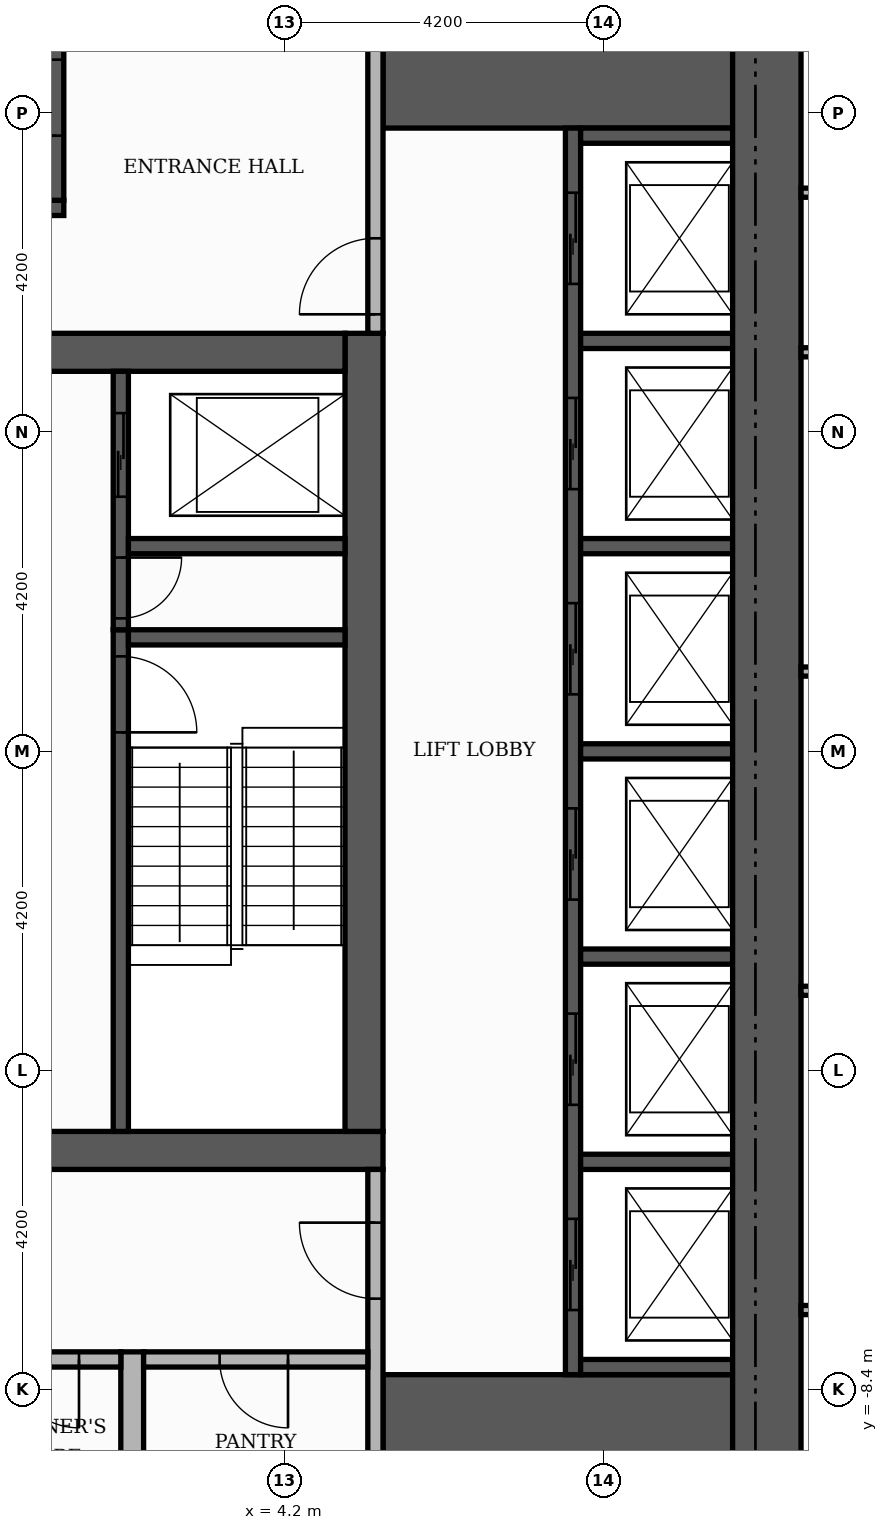
"""IFC4 building model, lengths in metres.
Left out: names, types, materials, properties, quantities, classifications, styles, units other than length and angle.
Written with IfcOpenShell. Run it as: python <this file> out.ifc"""

import sys

from ifc_helpers import new_model, si_unit, direction, frame, frame_2d, origin, place, context, subcontext, project, spatial, rectangle, extrude, element, fill, save


model = new_model("IFC4")
c1 = context("Model", 3, precision=1e-05, world=origin(), true_north=direction((0.0, 1.0)))
c2 = subcontext(c1, "Body", "Model", "MODEL_VIEW")
j1 = project(units=[si_unit("LENGTHUNIT", "METRE"), si_unit("PLANEANGLEUNIT", "RADIAN")], contexts=[c1])
p1 = place(None, origin())
s1 = spatial("IfcSite", under=j1, at=p1, CompositionType="ELEMENT")
p2 = place(p1, origin())
s2 = spatial("IfcBuilding", under=s1, at=p2, CompositionType="ELEMENT")
p3 = place(p2, frame((0.0, 0.0, 256.2)))
s3 = spatial("IfcBuildingStorey", under=s2, at=p3, CompositionType="ELEMENT", Elevation=256.2)
p4 = place(p3, frame((-5.5, -5.25, 0.0), z_axis=(0.0, 0.0, 1.0), x_axis=(1.0, 0.0, 0.0)))
e1 = element("IfcWall", 1, at=p4, inside=s3, PredefinedType="SHEAR", context=c2, shape_type="SweptSolid", body=[
    extrude(rectangle(XDim=11.0, YDim=0.5, at=frame_2d((5.5, 0.0))), origin(), (0.0, 0.0, 1.0), 3.48),
])
p5 = place(p4, frame((4.9, 0.0, 0.0)))
e2 = element("IfcOpeningElement", 2, at=p5, cuts=e1, PredefinedType="OPENING", context=c2, shape_type="SweptSolid", body=[
    extrude(rectangle(XDim=1.2, YDim=2.1, at=frame_2d((0.6, 1.05))), frame((0.0, 0.26, 0.0), z_axis=(0.0, -1.0, 0.0), x_axis=(1.0, 0.0, 0.0)), (0.0, 0.0, 1.0), 0.52),
])
p6 = place(p3, frame((5.25, -5.0, 0.0), z_axis=(0.0, 0.0, 1.0), x_axis=(0.0, 1.0, 0.0)))
e3 = element("IfcWall", 3, at=p6, inside=s3, PredefinedType="SHEAR", context=c2, shape_type="SweptSolid", body=[
    extrude(rectangle(XDim=10.5, YDim=0.5, at=frame_2d((5.25, 0.0))), origin(), (0.0, 0.0, 1.0), 3.48),
])
p7 = place(p3, frame((-5.0, 5.25, 0.0), z_axis=(0.0, 0.0, 1.0), x_axis=(1.0, 0.0, 0.0)))
e4 = element("IfcWall", 4, at=p7, inside=s3, PredefinedType="SHEAR", context=c2, shape_type="SweptSolid", body=[
    extrude(rectangle(XDim=10.0, YDim=0.5, at=frame_2d((5.0, 0.0))), origin(), (0.0, 0.0, 1.0), 3.48),
])
p8 = place(p7, frame((4.4, 0.0, 0.0)))
e5 = element("IfcOpeningElement", 5, at=p8, cuts=e4, PredefinedType="OPENING", context=c2, shape_type="SweptSolid", body=[
    extrude(rectangle(XDim=1.2, YDim=2.1, at=frame_2d((0.6, 1.05))), frame((0.0, 0.26, 0.0), z_axis=(0.0, -1.0, 0.0), x_axis=(1.0, 0.0, 0.0)), (0.0, 0.0, 1.0), 0.52),
])
for number, where, z_axis, x_axis in (
    (6, (5.5, -9.15, 0.0), (0.0, 0.0, 1.0), (1.0, 0.0, 0.0)),
    (7, (5.5, 9.15, 0.0), (0.0, 0.0, 1.0), (1.0, 0.0, 0.0)),
):
    element("IfcWall", number, at=place(p3, frame(where, z_axis=z_axis, x_axis=x_axis)), inside=s3, PredefinedType="SHEAR", context=c2, shape_type="SweptSolid", body=[
        extrude(rectangle(XDim=4.6, YDim=1.9, at=frame_2d((2.3, 0.0))), origin(), (0.0, 0.0, 1.0), 3.48),
    ])
p9 = place(p3, frame((2.05, -5.0, 0.0), z_axis=(0.0, 0.0, 1.0), x_axis=(0.0, 1.0, 0.0)))
e8 = element("IfcWall", 8, at=p9, inside=s3, PredefinedType="SHEAR", context=c2, shape_type="SweptSolid", body=[
    extrude(rectangle(XDim=6.6, YDim=0.2, at=frame_2d((3.3, 0.0))), origin(), (0.0, 0.0, 1.0), 3.48),
])
p10 = place(p9, frame((5.25, 0.0, 0.0)))
e9 = element("IfcOpeningElement", 9, at=p10, cuts=e8, PredefinedType="OPENING", context=c2, shape_type="SweptSolid", body=[
    extrude(rectangle(XDim=1.0, YDim=2.1, at=frame_2d((0.5, 1.05))), frame((0.0, 0.11, 0.0), z_axis=(0.0, -1.0, 0.0), x_axis=(1.0, 0.0, 0.0)), (0.0, 0.0, 1.0), 0.22),
])
p11 = place(p3, frame((2.15, 1.5, 0.0), z_axis=(0.0, 0.0, 1.0), x_axis=(1.0, 0.0, 0.0)))
e10 = element("IfcWall", 10, at=p11, inside=s3, PredefinedType="SHEAR", context=c2, shape_type="SweptSolid", body=[
    extrude(rectangle(XDim=2.85, YDim=0.2, at=frame_2d((1.425, 0.0))), origin(), (0.0, 0.0, 1.0), 3.48),
])
p12 = place(p3, frame((-5.5, 7.15, 0.0), z_axis=(0.0, 0.0, 1.0), x_axis=(1.0, 0.0, 0.0)))
e11 = element("IfcWall", 11, at=p12, inside=s3, PredefinedType="SHEAR", context=c2, shape_type="SweptSolid", body=[
    extrude(rectangle(XDim=6.8, YDim=0.2, at=frame_2d((3.4, 0.0))), origin(), (0.0, 0.0, 1.0), 3.48),
])
p13 = place(p3, frame((1.2, 7.25, 0.0), z_axis=(0.0, 0.0, 1.0), x_axis=(0.0, 1.0, 0.0)))
e12 = element("IfcWall", 12, at=p13, inside=s3, PredefinedType="SHEAR", context=c2, shape_type="SweptSolid", body=[
    extrude(rectangle(XDim=2.85, YDim=0.2, at=frame_2d((1.425, 0.0))), origin(), (0.0, 0.0, 1.0), 3.48),
])
p14 = place(p13, frame((0.85, 0.0, 0.0)))
e13 = element("IfcOpeningElement", 13, at=p14, cuts=e12, PredefinedType="OPENING", context=c2, shape_type="SweptSolid", body=[
    extrude(rectangle(XDim=1.0, YDim=2.1, at=frame_2d((0.5, 1.05))), frame((0.0, 0.11, 0.0), z_axis=(0.0, -1.0, 0.0), x_axis=(1.0, 0.0, 0.0)), (0.0, 0.0, 1.0), 0.22),
])
p15 = place(p3, frame((8.0, -8.2, 0.0), z_axis=(0.0, 0.0, 1.0), x_axis=(0.0, 1.0, 0.0)))
e14 = element("IfcWall", 14, at=p15, inside=s3, PredefinedType="SHEAR", context=c2, shape_type="SweptSolid", body=[
    extrude(rectangle(XDim=16.4, YDim=0.2, at=frame_2d((8.2, 0.0))), origin(), (0.0, 0.0, 1.0), 3.48),
])
p16 = place(p15, frame((0.85, 0.0, 0.0)))
e15 = element("IfcOpeningElement", 15, at=p16, cuts=e14, PredefinedType="OPENING", context=c2, shape_type="SweptSolid", body=[
    extrude(rectangle(XDim=1.2, YDim=2.1, at=frame_2d((0.6, 1.05))), frame((0.0, 0.11, 0.0), z_axis=(0.0, -1.0, 0.0), x_axis=(1.0, 0.0, 0.0)), (0.0, 0.0, 1.0), 0.22),
])
p17 = place(p15, frame((3.55, 0.0, 0.0)))
e16 = element("IfcOpeningElement", 16, at=p17, cuts=e14, PredefinedType="OPENING", context=c2, shape_type="SweptSolid", body=[
    extrude(rectangle(XDim=1.2, YDim=2.1, at=frame_2d((0.6, 1.05))), frame((0.0, 0.11, 0.0), z_axis=(0.0, -1.0, 0.0), x_axis=(1.0, 0.0, 0.0)), (0.0, 0.0, 1.0), 0.22),
])
p18 = place(p15, frame((6.25, 0.0, 0.0)))
e17 = element("IfcOpeningElement", 17, at=p18, cuts=e14, PredefinedType="OPENING", context=c2, shape_type="SweptSolid", body=[
    extrude(rectangle(XDim=1.2, YDim=2.1, at=frame_2d((0.6, 1.05))), frame((0.0, 0.11, 0.0), z_axis=(0.0, -1.0, 0.0), x_axis=(1.0, 0.0, 0.0)), (0.0, 0.0, 1.0), 0.22),
])
p19 = place(p15, frame((8.95, 0.0, 0.0)))
e18 = element("IfcOpeningElement", 18, at=p19, cuts=e14, PredefinedType="OPENING", context=c2, shape_type="SweptSolid", body=[
    extrude(rectangle(XDim=1.2, YDim=2.1, at=frame_2d((0.6, 1.05))), frame((0.0, 0.11, 0.0), z_axis=(0.0, -1.0, 0.0), x_axis=(1.0, 0.0, 0.0)), (0.0, 0.0, 1.0), 0.22),
])
p20 = place(p15, frame((11.65, 0.0, 0.0)))
e19 = element("IfcOpeningElement", 19, at=p20, cuts=e14, PredefinedType="OPENING", context=c2, shape_type="SweptSolid", body=[
    extrude(rectangle(XDim=1.2, YDim=2.1, at=frame_2d((0.6, 1.05))), frame((0.0, 0.11, 0.0), z_axis=(0.0, -1.0, 0.0), x_axis=(1.0, 0.0, 0.0)), (0.0, 0.0, 1.0), 0.22),
])
p21 = place(p15, frame((14.35, 0.0, 0.0)))
e20 = element("IfcOpeningElement", 20, at=p21, cuts=e14, PredefinedType="OPENING", context=c2, shape_type="SweptSolid", body=[
    extrude(rectangle(XDim=1.2, YDim=2.1, at=frame_2d((0.6, 1.05))), frame((0.0, 0.11, 0.0), z_axis=(0.0, -1.0, 0.0), x_axis=(1.0, 0.0, 0.0)), (0.0, 0.0, 1.0), 0.22),
])
for number, where, z_axis, x_axis in (
    (21, (8.1, -8.1, 0.0), (0.0, 0.0, 1.0), (1.0, 0.0, 0.0)),
    (22, (8.1, -5.4, 0.0), (0.0, 0.0, 1.0), (1.0, 0.0, 0.0)),
    (23, (8.1, -2.7, 0.0), (0.0, 0.0, 1.0), (1.0, 0.0, 0.0)),
    (24, (8.1, 0.0, 0.0), (0.0, 0.0, 1.0), (1.0, 0.0, 0.0)),
):
    element("IfcWall", number, at=place(p3, frame(where, z_axis=z_axis, x_axis=x_axis)), inside=s3, PredefinedType="SHEAR", context=c2, shape_type="SweptSolid", body=[
        extrude(rectangle(XDim=2.0, YDim=0.2, at=frame_2d((1.0, 0.0))), origin(), (0.0, 0.0, 1.0), 3.48),
    ])
p22 = place(p3, frame((2.05, 1.6, 0.0), z_axis=(0.0, 0.0, 1.0), x_axis=(0.0, 1.0, 0.0)))
e25 = element("IfcWall", 25, at=p22, inside=s3, PredefinedType="SHEAR", context=c2, shape_type="SweptSolid", body=[
    extrude(rectangle(XDim=3.4, YDim=0.2, at=frame_2d((1.7, 0.0))), origin(), (0.0, 0.0, 1.0), 3.48),
])
p23 = place(p22, frame((1.75, 0.0, 0.0)))
e26 = element("IfcOpeningElement", 26, at=p23, cuts=e25, PredefinedType="OPENING", context=c2, shape_type="SweptSolid", body=[
    extrude(rectangle(XDim=1.1, YDim=2.1, at=frame_2d((0.55, 1.05))), frame((0.0, 0.11, 0.0), z_axis=(0.0, -1.0, 0.0), x_axis=(1.0, 0.0, 0.0)), (0.0, 0.0, 1.0), 0.22),
])
p24 = place(p22, frame((0.15, 0.0, 0.0)))
e27 = element("IfcOpeningElement", 27, at=p24, cuts=e25, PredefinedType="OPENING", context=c2, shape_type="SweptSolid", body=[
    extrude(rectangle(XDim=0.8, YDim=2.1, at=frame_2d((0.4, 1.05))), frame((0.0, 0.11, 0.0), z_axis=(0.0, -1.0, 0.0), x_axis=(1.0, 0.0, 0.0)), (0.0, 0.0, 1.0), 0.22),
])
p25 = place(p3, frame((2.15, 2.7, 0.0), z_axis=(0.0, 0.0, 1.0), x_axis=(1.0, 0.0, 0.0)))
e28 = element("IfcWall", 28, at=p25, inside=s3, PredefinedType="SHEAR", context=c2, shape_type="SweptSolid", body=[
    extrude(rectangle(XDim=2.85, YDim=0.2, at=frame_2d((1.425, 0.0))), origin(), (0.0, 0.0, 1.0), 3.48),
])
for number, where, z_axis, x_axis in (
    (29, (8.1, 2.7, 0.0), (0.0, 0.0, 1.0), (1.0, 0.0, 0.0)),
    (30, (8.1, 5.4, 0.0), (0.0, 0.0, 1.0), (1.0, 0.0, 0.0)),
    (31, (8.1, 8.1, 0.0), (0.0, 0.0, 1.0), (1.0, 0.0, 0.0)),
):
    element("IfcWall", number, at=place(p3, frame(where, z_axis=z_axis, x_axis=x_axis)), inside=s3, PredefinedType="SHEAR", context=c2, shape_type="SweptSolid", body=[
        extrude(rectangle(XDim=2.0, YDim=0.2, at=frame_2d((1.0, 0.0))), origin(), (0.0, 0.0, 1.0), 3.48),
    ])
p26 = place(p3, frame((10.55, -10.1, 0.0), z_axis=(0.0, 0.0, 1.0), x_axis=(0.0, 1.0, 0.0)))
e32 = element("IfcWall", 32, at=p26, inside=s3, PredefinedType="SHEAR", context=c2, shape_type="SweptSolid", body=[
    extrude(rectangle(XDim=20.2, YDim=0.9, at=frame_2d((10.1, 0.0))), origin(), (0.0, 0.0, 1.0), 3.48),
])
p27 = place(p3, frame((2.2, -10.1, 0.0), z_axis=(0.0, 0.0, 1.0), x_axis=(0.0, 1.0, 0.0)))
e33 = element("IfcWall", 33, at=p27, inside=s3, PredefinedType="PARTITIONING", context=c2, shape_type="SweptSolid", body=[
    extrude(rectangle(XDim=2.2, YDim=0.3, at=frame_2d((1.1, 0.0))), origin(), (0.0, 0.0, 1.0), 3.48),
])
p28 = place(p3, frame((5.4, -10.1, 0.0), z_axis=(0.0, 0.0, 1.0), x_axis=(0.0, 1.0, 0.0)))
e34 = element("IfcWall", 34, at=p28, inside=s3, PredefinedType="PARTITIONING", context=c2, shape_type="SweptSolid", body=[
    extrude(rectangle(XDim=4.6, YDim=0.2, at=frame_2d((2.3, 0.0))), origin(), (0.0, 0.0, 1.0), 3.48),
])
p29 = place(p28, frame((2.9, 0.0, 0.0)))
e35 = element("IfcOpeningElement", 35, at=p29, cuts=e34, PredefinedType="OPENING", context=c2, shape_type="SweptSolid", body=[
    extrude(rectangle(XDim=1.0, YDim=2.1, at=frame_2d((0.5, 1.05))), frame((0.0, 0.11, 0.0), z_axis=(0.0, -1.0, 0.0), x_axis=(1.0, 0.0, 0.0)), (0.0, 0.0, 1.0), 0.22),
])
p30 = place(p3, frame((0.1, -8.0, 0.0), z_axis=(0.0, 0.0, 1.0), x_axis=(1.0, 0.0, 0.0)))
e36 = element("IfcWall", 36, at=p30, inside=s3, PredefinedType="PARTITIONING", context=c2, shape_type="SweptSolid", body=[
    extrude(rectangle(XDim=1.95, YDim=0.2, at=frame_2d((0.975, 0.0))), origin(), (0.0, 0.0, 1.0), 3.48),
])
p31 = place(p30, frame((0.5, 0.0, 0.0)))
e37 = element("IfcOpeningElement", 37, at=p31, cuts=e36, PredefinedType="OPENING", context=c2, shape_type="SweptSolid", body=[
    extrude(rectangle(XDim=0.9, YDim=2.1, at=frame_2d((0.45, 1.05))), frame((0.0, 0.11, 0.0), z_axis=(0.0, -1.0, 0.0), x_axis=(1.0, 0.0, 0.0)), (0.0, 0.0, 1.0), 0.22),
])
p32 = place(p3, frame((2.35, -8.0, 0.0), z_axis=(0.0, 0.0, 1.0), x_axis=(1.0, 0.0, 0.0)))
e38 = element("IfcWall", 38, at=p32, inside=s3, PredefinedType="PARTITIONING", context=c2, shape_type="SweptSolid", body=[
    extrude(rectangle(XDim=2.95, YDim=0.2, at=frame_2d((1.475, 0.0))), origin(), (0.0, 0.0, 1.0), 3.48),
])
p33 = place(p32, frame((1.0, 0.0, 0.0)))
e39 = element("IfcOpeningElement", 39, at=p33, cuts=e38, PredefinedType="OPENING", context=c2, shape_type="SweptSolid", body=[
    extrude(rectangle(XDim=0.9, YDim=2.1, at=frame_2d((0.45, 1.05))), frame((0.0, 0.11, 0.0), z_axis=(0.0, -1.0, 0.0), x_axis=(1.0, 0.0, 0.0)), (0.0, 0.0, 1.0), 0.22),
])
p34 = place(p3, frame((5.4, 5.5, 0.0), z_axis=(0.0, 0.0, 1.0), x_axis=(0.0, 1.0, 0.0)))
e40 = element("IfcWall", 40, at=p34, inside=s3, PredefinedType="PARTITIONING", context=c2, shape_type="SweptSolid", body=[
    extrude(rectangle(XDim=4.6, YDim=0.2, at=frame_2d((2.3, 0.0))), origin(), (0.0, 0.0, 1.0), 3.48),
])
p35 = place(p34, frame((0.25, 0.0, 0.0)))
e41 = element("IfcOpeningElement", 41, at=p35, cuts=e40, PredefinedType="OPENING", context=c2, shape_type="SweptSolid", body=[
    extrude(rectangle(XDim=1.0, YDim=2.1, at=frame_2d((0.5, 1.05))), frame((0.0, 0.11, 0.0), z_axis=(0.0, -1.0, 0.0), x_axis=(1.0, 0.0, 0.0)), (0.0, 0.0, 1.0), 0.22),
])
p36 = place(p3, frame((11.0, -7.35, 0.0), z_axis=(0.0, 0.0, 1.0), x_axis=(1.0, 0.0, 0.0)))
e42 = element("IfcWall", 42, at=p36, inside=s3, PredefinedType="PARTITIONING", context=c2, shape_type="SweptSolid", body=[
    extrude(rectangle(XDim=7.62, YDim=0.12, at=frame_2d((3.81, 0.0))), origin(), (0.0, 0.0, 1.0), 3.48),
])
p37 = place(p36, frame((3.36, 0.0, 0.0)))
e43 = element("IfcOpeningElement", 43, at=p37, cuts=e42, PredefinedType="OPENING", context=c2, shape_type="SweptSolid", body=[
    extrude(rectangle(XDim=0.9, YDim=2.1, at=frame_2d((0.45, 1.05))), frame((0.0, 0.07, 0.0), z_axis=(0.0, -1.0, 0.0), x_axis=(1.0, 0.0, 0.0)), (0.0, 0.0, 1.0), 0.14),
])
for number, where, z_axis, x_axis in (
    (44, (11.0, -3.15, 0.0), (0.0, 0.0, 1.0), (1.0, 0.0, 0.0)),
    (45, (11.0, 1.05, 0.0), (0.0, 0.0, 1.0), (1.0, 0.0, 0.0)),
    (46, (11.0, 5.25, 0.0), (0.0, 0.0, 1.0), (1.0, 0.0, 0.0)),
    (47, (11.0, 7.35, 0.0), (0.0, 0.0, 1.0), (1.0, 0.0, 0.0)),
):
    element("IfcWall", number, at=place(p3, frame(where, z_axis=z_axis, x_axis=x_axis)), inside=s3, PredefinedType="PARTITIONING", context=c2, shape_type="SweptSolid", body=[
        extrude(rectangle(XDim=7.62, YDim=0.12, at=frame_2d((3.81, 0.0))), origin(), (0.0, 0.0, 1.0), 3.48),
    ])
p38 = place(p16, origin())
e48 = element("IfcDoor", 48, at=p38, inside=s3, OperationType="SLIDING_TO_LEFT", PredefinedType="DOOR", context=c2, shape_type="SweptSolid", body=[
    extrude(rectangle(XDim=1.2, YDim=2.1, at=frame_2d((0.6, 1.05))), frame((0.0, 0.025, 0.0), z_axis=(0.0, -1.0, 0.0), x_axis=(1.0, 0.0, 0.0)), (0.0, 0.0, 1.0), 0.05),
])
fill(e15, e48)
p39 = place(p17, origin())
e49 = element("IfcDoor", 49, at=p39, inside=s3, OperationType="SLIDING_TO_LEFT", PredefinedType="DOOR", context=c2, shape_type="SweptSolid", body=[
    extrude(rectangle(XDim=1.2, YDim=2.1, at=frame_2d((0.6, 1.05))), frame((0.0, 0.025, 0.0), z_axis=(0.0, -1.0, 0.0), x_axis=(1.0, 0.0, 0.0)), (0.0, 0.0, 1.0), 0.05),
])
fill(e16, e49)
p40 = place(p18, origin())
e50 = element("IfcDoor", 50, at=p40, inside=s3, OperationType="SLIDING_TO_LEFT", PredefinedType="DOOR", context=c2, shape_type="SweptSolid", body=[
    extrude(rectangle(XDim=1.2, YDim=2.1, at=frame_2d((0.6, 1.05))), frame((0.0, 0.025, 0.0), z_axis=(0.0, -1.0, 0.0), x_axis=(1.0, 0.0, 0.0)), (0.0, 0.0, 1.0), 0.05),
])
fill(e17, e50)
p41 = place(p19, origin())
e51 = element("IfcDoor", 51, at=p41, inside=s3, OperationType="SLIDING_TO_LEFT", PredefinedType="DOOR", context=c2, shape_type="SweptSolid", body=[
    extrude(rectangle(XDim=1.2, YDim=2.1, at=frame_2d((0.6, 1.05))), frame((0.0, 0.025, 0.0), z_axis=(0.0, -1.0, 0.0), x_axis=(1.0, 0.0, 0.0)), (0.0, 0.0, 1.0), 0.05),
])
fill(e18, e51)
p42 = place(p20, origin())
e52 = element("IfcDoor", 52, at=p42, inside=s3, OperationType="SLIDING_TO_LEFT", PredefinedType="DOOR", context=c2, shape_type="SweptSolid", body=[
    extrude(rectangle(XDim=1.2, YDim=2.1, at=frame_2d((0.6, 1.05))), frame((0.0, 0.025, 0.0), z_axis=(0.0, -1.0, 0.0), x_axis=(1.0, 0.0, 0.0)), (0.0, 0.0, 1.0), 0.05),
])
fill(e19, e52)
p43 = place(p21, origin())
e53 = element("IfcDoor", 53, at=p43, inside=s3, OperationType="SLIDING_TO_LEFT", PredefinedType="DOOR", context=c2, shape_type="SweptSolid", body=[
    extrude(rectangle(XDim=1.2, YDim=2.1, at=frame_2d((0.6, 1.05))), frame((0.0, 0.025, 0.0), z_axis=(0.0, -1.0, 0.0), x_axis=(1.0, 0.0, 0.0)), (0.0, 0.0, 1.0), 0.05),
])
fill(e20, e53)
p44 = place(p23, origin())
e54 = element("IfcDoor", 54, at=p44, inside=s3, OperationType="SLIDING_TO_LEFT", PredefinedType="DOOR", context=c2, shape_type="SweptSolid", body=[
    extrude(rectangle(XDim=1.1, YDim=2.1, at=frame_2d((0.55, 1.05))), frame((0.0, 0.025, 0.0), z_axis=(0.0, -1.0, 0.0), x_axis=(1.0, 0.0, 0.0)), (0.0, 0.0, 1.0), 0.05),
])
fill(e26, e54)
p45 = place(p10, frame((1.0, 0.0, 0.0), z_axis=(0.0, 0.0, 1.0), x_axis=(-1.0, 0.0, 0.0)))
e55 = element("IfcDoor", 55, at=p45, inside=s3, OperationType="SINGLE_SWING_LEFT", PredefinedType="DOOR", context=c2, shape_type="SweptSolid", body=[
    extrude(rectangle(XDim=1.0, YDim=2.1, at=frame_2d((0.5, 1.05))), frame((0.0, 0.025, 0.0), z_axis=(0.0, -1.0, 0.0), x_axis=(1.0, 0.0, 0.0)), (0.0, 0.0, 1.0), 0.05),
])
fill(e9, e55)
p46 = place(p24, frame((0.8, 0.0, 0.0), z_axis=(0.0, 0.0, 1.0), x_axis=(-1.0, 0.0, 0.0)))
e56 = element("IfcDoor", 56, at=p46, inside=s3, OperationType="SINGLE_SWING_RIGHT", PredefinedType="DOOR", context=c2, shape_type="SweptSolid", body=[
    extrude(rectangle(XDim=0.8, YDim=2.1, at=frame_2d((0.4, 1.05))), frame((0.0, 0.025, 0.0), z_axis=(0.0, -1.0, 0.0), x_axis=(1.0, 0.0, 0.0)), (0.0, 0.0, 1.0), 0.05),
])
fill(e27, e56)
p47 = place(p14, origin())
e57 = element("IfcDoor", 57, at=p47, inside=s3, OperationType="SINGLE_SWING_LEFT", PredefinedType="DOOR", context=c2, shape_type="SweptSolid", body=[
    extrude(rectangle(XDim=1.0, YDim=2.1, at=frame_2d((0.5, 1.05))), frame((0.0, 0.025, 0.0), z_axis=(0.0, -1.0, 0.0), x_axis=(1.0, 0.0, 0.0)), (0.0, 0.0, 1.0), 0.05),
])
fill(e13, e57)
p48 = place(p35, origin())
e58 = element("IfcDoor", 58, at=p48, inside=s3, OperationType="SINGLE_SWING_LEFT", PredefinedType="DOOR", context=c2, shape_type="SweptSolid", body=[
    extrude(rectangle(XDim=1.0, YDim=2.1, at=frame_2d((0.5, 1.05))), frame((0.0, 0.025, 0.0), z_axis=(0.0, -1.0, 0.0), x_axis=(1.0, 0.0, 0.0)), (0.0, 0.0, 1.0), 0.05),
])
fill(e41, e58)
p49 = place(p29, origin())
e59 = element("IfcDoor", 59, at=p49, inside=s3, OperationType="SINGLE_SWING_RIGHT", PredefinedType="DOOR", context=c2, shape_type="SweptSolid", body=[
    extrude(rectangle(XDim=1.0, YDim=2.1, at=frame_2d((0.5, 1.05))), frame((0.0, 0.025, 0.0), z_axis=(0.0, -1.0, 0.0), x_axis=(1.0, 0.0, 0.0)), (0.0, 0.0, 1.0), 0.05),
])
fill(e35, e59)
p50 = place(p31, frame((0.9, 0.0, 0.0), z_axis=(0.0, 0.0, 1.0), x_axis=(-1.0, 0.0, 0.0)))
e60 = element("IfcDoor", 60, at=p50, inside=s3, OperationType="SINGLE_SWING_RIGHT", PredefinedType="DOOR", context=c2, shape_type="SweptSolid", body=[
    extrude(rectangle(XDim=0.9, YDim=2.1, at=frame_2d((0.45, 1.05))), frame((0.0, 0.025, 0.0), z_axis=(0.0, -1.0, 0.0), x_axis=(1.0, 0.0, 0.0)), (0.0, 0.0, 1.0), 0.05),
])
fill(e37, e60)
p51 = place(p33, frame((0.9, 0.0, 0.0), z_axis=(0.0, 0.0, 1.0), x_axis=(-1.0, 0.0, 0.0)))
e61 = element("IfcDoor", 61, at=p51, inside=s3, OperationType="SINGLE_SWING_RIGHT", PredefinedType="DOOR", context=c2, shape_type="SweptSolid", body=[
    extrude(rectangle(XDim=0.9, YDim=2.1, at=frame_2d((0.45, 1.05))), frame((0.0, 0.025, 0.0), z_axis=(0.0, -1.0, 0.0), x_axis=(1.0, 0.0, 0.0)), (0.0, 0.0, 1.0), 0.05),
])
fill(e39, e61)
save(model, sys.argv[1])
